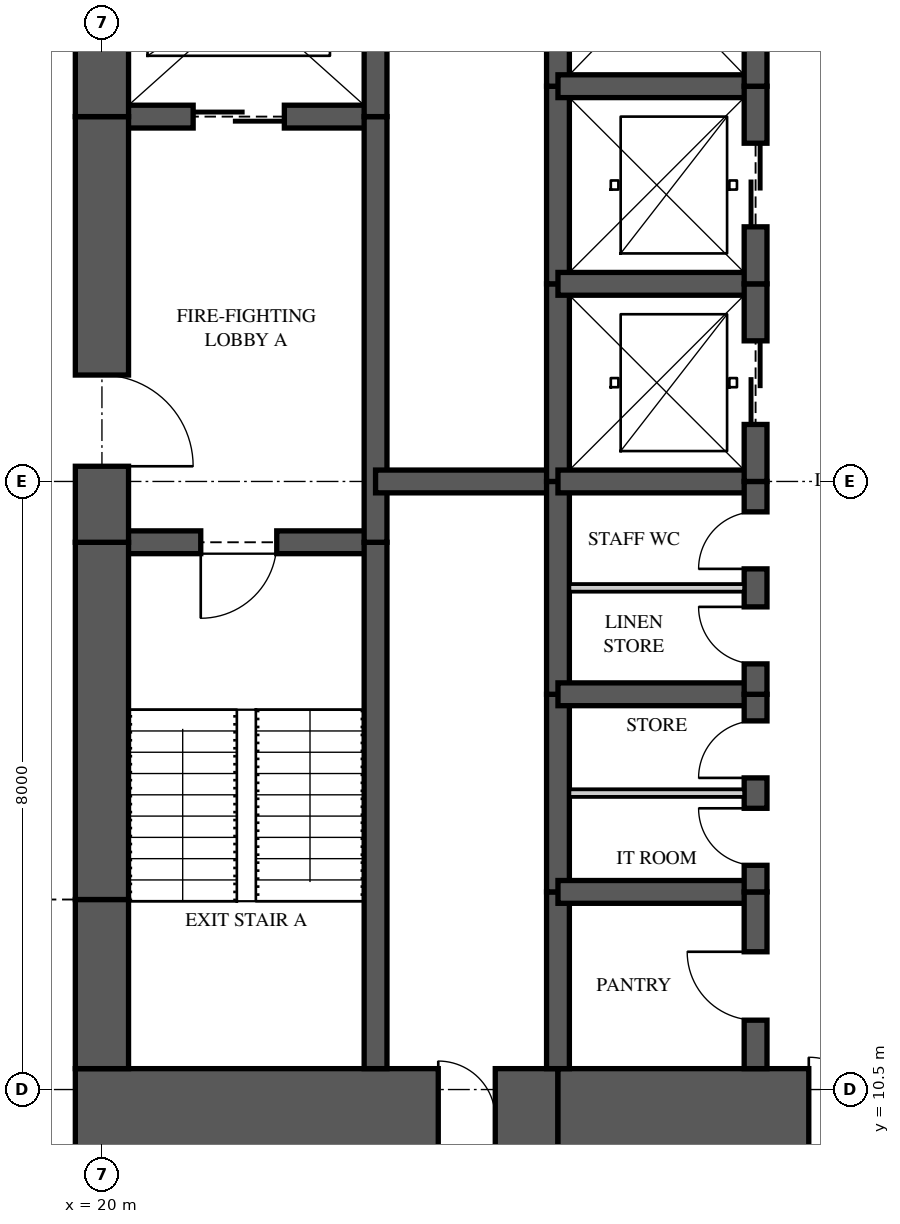
"""IFC4 building model, lengths in metres.
Left out: names, types, materials, properties, quantities, classifications, styles, units other than length and angle.
Written with IfcOpenShell. Run it as: python <this file> out.ifc"""

import sys

from ifc_helpers import new_model, si_unit, direction, frame, frame_2d, origin, place, context, subcontext, project, spatial, rectangle, extrude, element, fill, save


model = new_model("IFC4")
c1 = context("Model", 3, precision=1e-05, world=origin(), true_north=direction((0.0, 1.0)))
c2 = subcontext(c1, "Body", "Model", "MODEL_VIEW")
j1 = project(units=[si_unit("LENGTHUNIT", "METRE"), si_unit("PLANEANGLEUNIT", "RADIAN")], contexts=[c1])
p1 = place(None, origin())
s1 = spatial("IfcSite", under=j1, at=p1, CompositionType="ELEMENT")
p2 = place(p1, origin())
s2 = spatial("IfcBuilding", under=s1, at=p2, CompositionType="ELEMENT")
p3 = place(p2, frame((0.0, 0.0, 194.55)))
s3 = spatial("IfcBuildingStorey", under=s2, at=p3, CompositionType="ELEMENT", Elevation=194.55)
p4 = place(p3, frame((19.65, 10.125, 0.0), z_axis=(0.0, 0.0, 1.0), x_axis=(1.0, 0.0, 0.0)))
e1 = element("IfcWall", 1, at=p4, inside=s3, PredefinedType="SHEAR", context=c2, shape_type="SweptSolid", body=[
    extrude(rectangle(XDim=6.35, YDim=1.3, at=frame_2d((3.175, 0.0))), origin(), (0.0, 0.0, 1.0), 3.35),
])
p5 = place(p4, frame((4.775, 0.0, 0.0)))
e2 = element("IfcOpeningElement", 2, at=p5, cuts=e1, PredefinedType="OPENING", context=c2, shape_type="SweptSolid", body=[
    extrude(rectangle(XDim=0.75, YDim=2.1, at=frame_2d((0.375, 1.05))), frame((0.0, 0.66, 0.0), z_axis=(0.0, -1.0, 0.0), x_axis=(1.0, 0.0, 0.0)), (0.0, 0.0, 1.0), 1.32),
])
p6 = place(p3, frame((26.0, 10.125, 0.0), z_axis=(0.0, 0.0, 1.0), x_axis=(1.0, 0.0, 0.0)))
e3 = element("IfcWall", 3, at=p6, inside=s3, PredefinedType="SHEAR", context=c2, shape_type="SweptSolid", body=[
    extrude(rectangle(XDim=5.6, YDim=1.3, at=frame_2d((2.8, 0.0))), origin(), (0.0, 0.0, 1.0), 3.35),
])
p7 = place(p6, frame((3.3, 0.0, 0.0)))
e4 = element("IfcOpeningElement", 4, at=p7, cuts=e3, PredefinedType="OPENING", context=c2, shape_type="SweptSolid", body=[
    extrude(rectangle(XDim=1.6, YDim=2.1, at=frame_2d((0.8, 1.05))), frame((0.0, 0.66, 0.0), z_axis=(0.0, -1.0, 0.0), x_axis=(1.0, 0.0, 0.0)), (0.0, 0.0, 1.0), 1.32),
])
p8 = place(p3, frame((20.0, 26.225, 0.0), z_axis=(0.0, 0.0, 1.0), x_axis=(0.0, -1.0, 0.0)))
e5 = element("IfcWall", 5, at=p8, inside=s3, PredefinedType="SHEAR", context=c2, shape_type="SweptSolid", body=[
    extrude(rectangle(XDim=2.925, YDim=0.7, at=frame_2d((1.462, 0.0))), origin(), (0.0, 0.0, 1.0), 3.35),
])
p9 = place(p3, frame((20.0, 23.3, 0.0), z_axis=(0.0, 0.0, 1.0), x_axis=(0.0, -1.0, 0.0)))
e6 = element("IfcWall", 6, at=p9, inside=s3, PredefinedType="SHEAR", context=c2, shape_type="SweptSolid", body=[
    extrude(rectangle(XDim=5.6, YDim=0.7, at=frame_2d((2.8, 0.0))), origin(), (0.0, 0.0, 1.0), 3.35),
])
p10 = place(p9, frame((3.4, 0.0, 0.0)))
e7 = element("IfcOpeningElement", 7, at=p10, cuts=e6, PredefinedType="OPENING", context=c2, shape_type="SweptSolid", body=[
    extrude(rectangle(XDim=1.2, YDim=2.2, at=frame_2d((0.6, 1.1))), frame((0.0, 0.36, 0.0), z_axis=(0.0, -1.0, 0.0), x_axis=(1.0, 0.0, 0.0)), (0.0, 0.0, 1.0), 0.72),
])
p11 = place(p3, frame((20.0, 17.7, 0.0), z_axis=(0.0, 0.0, 1.0), x_axis=(0.0, -1.0, 0.0)))
e8 = element("IfcWall", 8, at=p11, inside=s3, PredefinedType="SHEAR", context=c2, shape_type="SweptSolid", body=[
    extrude(rectangle(XDim=4.7, YDim=0.7, at=frame_2d((2.35, 0.0))), origin(), (0.0, 0.0, 1.0), 3.35),
])
p12 = place(p3, frame((20.0, 13.0, 0.0), z_axis=(0.0, 0.0, 1.0), x_axis=(0.0, -1.0, 0.0)))
e9 = element("IfcWall", 9, at=p12, inside=s3, PredefinedType="SHEAR", context=c2, shape_type="SweptSolid", body=[
    extrude(rectangle(XDim=2.225, YDim=0.7, at=frame_2d((1.113, 0.0))), origin(), (0.0, 0.0, 1.0), 3.35),
])
p13 = place(p3, frame((23.6, 10.775, 0.0), z_axis=(0.0, 0.0, 1.0), x_axis=(0.0, 1.0, 0.0)))
e10 = element("IfcWall", 10, at=p13, inside=s3, PredefinedType="SHEAR", context=c2, shape_type="SweptSolid", body=[
    extrude(rectangle(XDim=6.925, YDim=0.3, at=frame_2d((3.462, 0.0))), origin(), (0.0, 0.0, 1.0), 3.35),
])
p14 = place(p3, frame((23.6, 17.7, 0.0), z_axis=(0.0, 0.0, 1.0), x_axis=(0.0, 1.0, 0.0)))
e11 = element("IfcWall", 11, at=p14, inside=s3, PredefinedType="SHEAR", context=c2, shape_type="SweptSolid", body=[
    extrude(rectangle(XDim=5.6, YDim=0.3, at=frame_2d((2.8, 0.0))), origin(), (0.0, 0.0, 1.0), 3.35),
])
p15 = place(p3, frame((23.6, 23.3, 0.0), z_axis=(0.0, 0.0, 1.0), x_axis=(0.0, 1.0, 0.0)))
e12 = element("IfcWall", 12, at=p15, inside=s3, PredefinedType="SHEAR", context=c2, shape_type="SweptSolid", body=[
    extrude(rectangle(XDim=2.925, YDim=0.3, at=frame_2d((1.462, 0.0))), origin(), (0.0, 0.0, 1.0), 3.35),
])
p16 = place(p3, frame((26.0, 10.775, 0.0), z_axis=(0.0, 0.0, 1.0), x_axis=(0.0, 1.0, 0.0)))
e13 = element("IfcWall", 13, at=p16, inside=s3, PredefinedType="SHEAR", context=c2, shape_type="SweptSolid", body=[
    extrude(rectangle(XDim=2.325, YDim=0.3, at=frame_2d((1.163, 0.0))), origin(), (0.0, 0.0, 1.0), 3.35),
])
p17 = place(p3, frame((26.0, 13.1, 0.0), z_axis=(0.0, 0.0, 1.0), x_axis=(0.0, 1.0, 0.0)))
e14 = element("IfcWall", 14, at=p17, inside=s3, PredefinedType="SHEAR", context=c2, shape_type="SweptSolid", body=[
    extrude(rectangle(XDim=2.6, YDim=0.3, at=frame_2d((1.3, 0.0))), origin(), (0.0, 0.0, 1.0), 3.35),
])
p18 = place(p3, frame((26.0, 15.7, 0.0), z_axis=(0.0, 0.0, 1.0), x_axis=(0.0, 1.0, 0.0)))
e15 = element("IfcWall", 15, at=p18, inside=s3, PredefinedType="SHEAR", context=c2, shape_type="SweptSolid", body=[
    extrude(rectangle(XDim=2.8, YDim=0.3, at=frame_2d((1.4, 0.0))), origin(), (0.0, 0.0, 1.0), 3.35),
])
p19 = place(p3, frame((26.0, 18.5, 0.0), z_axis=(0.0, 0.0, 1.0), x_axis=(0.0, 1.0, 0.0)))
e16 = element("IfcWall", 16, at=p19, inside=s3, PredefinedType="SHEAR", context=c2, shape_type="SweptSolid", body=[
    extrude(rectangle(XDim=2.6, YDim=0.3, at=frame_2d((1.3, 0.0))), origin(), (0.0, 0.0, 1.0), 3.35),
])
p20 = place(p3, frame((26.0, 21.1, 0.0), z_axis=(0.0, 0.0, 1.0), x_axis=(0.0, 1.0, 0.0)))
e17 = element("IfcWall", 17, at=p20, inside=s3, PredefinedType="SHEAR", context=c2, shape_type="SweptSolid", body=[
    extrude(rectangle(XDim=2.6, YDim=0.3, at=frame_2d((1.3, 0.0))), origin(), (0.0, 0.0, 1.0), 3.35),
])
p21 = place(p3, frame((26.0, 23.7, 0.0), z_axis=(0.0, 0.0, 1.0), x_axis=(0.0, 1.0, 0.0)))
e18 = element("IfcWall", 18, at=p21, inside=s3, PredefinedType="SHEAR", context=c2, shape_type="SweptSolid", body=[
    extrude(rectangle(XDim=2.525, YDim=0.3, at=frame_2d((1.263, 0.0))), origin(), (0.0, 0.0, 1.0), 3.35),
])
p22 = place(p3, frame((28.6, 10.775, 0.0), z_axis=(0.0, 0.0, 1.0), x_axis=(0.0, 1.0, 0.0)))
e19 = element("IfcWall", 19, at=p22, inside=s3, PredefinedType="SHEAR", context=c2, shape_type="SweptSolid", body=[
    extrude(rectangle(XDim=2.325, YDim=0.3, at=frame_2d((1.163, 0.0))), origin(), (0.0, 0.0, 1.0), 3.35),
])
p23 = place(p22, frame((0.637, 0.0, 0.0)))
e20 = element("IfcOpeningElement", 20, at=p23, cuts=e19, PredefinedType="OPENING", context=c2, shape_type="SweptSolid", body=[
    extrude(rectangle(XDim=0.9, YDim=2.1, at=frame_2d((0.45, 1.05))), frame((0.0, 0.16, 0.0), z_axis=(0.0, -1.0, 0.0), x_axis=(1.0, 0.0, 0.0)), (0.0, 0.0, 1.0), 0.32),
])
p24 = place(p3, frame((28.6, 13.1, 0.0), z_axis=(0.0, 0.0, 1.0), x_axis=(0.0, 1.0, 0.0)))
e21 = element("IfcWall", 21, at=p24, inside=s3, PredefinedType="SHEAR", context=c2, shape_type="SweptSolid", body=[
    extrude(rectangle(XDim=2.6, YDim=0.3, at=frame_2d((1.3, 0.0))), origin(), (0.0, 0.0, 1.0), 3.35),
])
p25 = place(p24, frame((0.35, 0.0, 0.0)))
e22 = element("IfcOpeningElement", 22, at=p25, cuts=e21, PredefinedType="OPENING", context=c2, shape_type="SweptSolid", body=[
    extrude(rectangle(XDim=0.75, YDim=2.1, at=frame_2d((0.375, 1.05))), frame((0.0, 0.16, 0.0), z_axis=(0.0, -1.0, 0.0), x_axis=(1.0, 0.0, 0.0)), (0.0, 0.0, 1.0), 0.32),
])
p26 = place(p24, frame((1.5, 0.0, 0.0)))
e23 = element("IfcOpeningElement", 23, at=p26, cuts=e21, PredefinedType="OPENING", context=c2, shape_type="SweptSolid", body=[
    extrude(rectangle(XDim=0.75, YDim=2.1, at=frame_2d((0.375, 1.05))), frame((0.0, 0.16, 0.0), z_axis=(0.0, -1.0, 0.0), x_axis=(1.0, 0.0, 0.0)), (0.0, 0.0, 1.0), 0.32),
])
p27 = place(p3, frame((28.6, 15.7, 0.0), z_axis=(0.0, 0.0, 1.0), x_axis=(0.0, 1.0, 0.0)))
e24 = element("IfcWall", 24, at=p27, inside=s3, PredefinedType="SHEAR", context=c2, shape_type="SweptSolid", body=[
    extrude(rectangle(XDim=2.8, YDim=0.3, at=frame_2d((1.4, 0.0))), origin(), (0.0, 0.0, 1.0), 3.35),
])
p28 = place(p27, frame((0.4, 0.0, 0.0)))
e25 = element("IfcOpeningElement", 25, at=p28, cuts=e24, PredefinedType="OPENING", context=c2, shape_type="SweptSolid", body=[
    extrude(rectangle(XDim=0.75, YDim=2.1, at=frame_2d((0.375, 1.05))), frame((0.0, 0.16, 0.0), z_axis=(0.0, -1.0, 0.0), x_axis=(1.0, 0.0, 0.0)), (0.0, 0.0, 1.0), 0.32),
])
p29 = place(p27, frame((1.65, 0.0, 0.0)))
e26 = element("IfcOpeningElement", 26, at=p29, cuts=e24, PredefinedType="OPENING", context=c2, shape_type="SweptSolid", body=[
    extrude(rectangle(XDim=0.75, YDim=2.1, at=frame_2d((0.375, 1.05))), frame((0.0, 0.16, 0.0), z_axis=(0.0, -1.0, 0.0), x_axis=(1.0, 0.0, 0.0)), (0.0, 0.0, 1.0), 0.32),
])
p30 = place(p3, frame((28.6, 18.5, 0.0), z_axis=(0.0, 0.0, 1.0), x_axis=(0.0, 1.0, 0.0)))
e27 = element("IfcWall", 27, at=p30, inside=s3, PredefinedType="SHEAR", context=c2, shape_type="SweptSolid", body=[
    extrude(rectangle(XDim=2.6, YDim=0.3, at=frame_2d((1.3, 0.0))), origin(), (0.0, 0.0, 1.0), 3.35),
])
p31 = place(p30, frame((0.75, 0.0, 0.0)))
e28 = element("IfcOpeningElement", 28, at=p31, cuts=e27, PredefinedType="OPENING", context=c2, shape_type="SweptSolid", body=[
    extrude(rectangle(XDim=1.1, YDim=2.1, at=frame_2d((0.55, 1.05))), frame((0.0, 0.16, 0.0), z_axis=(0.0, -1.0, 0.0), x_axis=(1.0, 0.0, 0.0)), (0.0, 0.0, 1.0), 0.32),
])
p32 = place(p3, frame((28.6, 21.1, 0.0), z_axis=(0.0, 0.0, 1.0), x_axis=(0.0, 1.0, 0.0)))
e29 = element("IfcWall", 29, at=p32, inside=s3, PredefinedType="SHEAR", context=c2, shape_type="SweptSolid", body=[
    extrude(rectangle(XDim=2.6, YDim=0.3, at=frame_2d((1.3, 0.0))), origin(), (0.0, 0.0, 1.0), 3.35),
])
p33 = place(p32, frame((0.75, 0.0, 0.0)))
e30 = element("IfcOpeningElement", 30, at=p33, cuts=e29, PredefinedType="OPENING", context=c2, shape_type="SweptSolid", body=[
    extrude(rectangle(XDim=1.1, YDim=2.1, at=frame_2d((0.55, 1.05))), frame((0.0, 0.16, 0.0), z_axis=(0.0, -1.0, 0.0), x_axis=(1.0, 0.0, 0.0)), (0.0, 0.0, 1.0), 0.32),
])
p34 = place(p3, frame((28.6, 23.7, 0.0), z_axis=(0.0, 0.0, 1.0), x_axis=(0.0, 1.0, 0.0)))
e31 = element("IfcWall", 31, at=p34, inside=s3, PredefinedType="SHEAR", context=c2, shape_type="SweptSolid", body=[
    extrude(rectangle(XDim=2.525, YDim=0.3, at=frame_2d((1.263, 0.0))), origin(), (0.0, 0.0, 1.0), 3.35),
])
p35 = place(p34, frame((0.85, 0.0, 0.0)))
e32 = element("IfcOpeningElement", 32, at=p35, cuts=e31, PredefinedType="OPENING", context=c2, shape_type="SweptSolid", body=[
    extrude(rectangle(XDim=1.1, YDim=2.1, at=frame_2d((0.55, 1.05))), frame((0.0, 0.16, 0.0), z_axis=(0.0, -1.0, 0.0), x_axis=(1.0, 0.0, 0.0)), (0.0, 0.0, 1.0), 0.32),
])
p36 = place(p3, frame((20.0, 17.7, 0.0), z_axis=(0.0, 0.0, 1.0), x_axis=(1.0, 0.0, 0.0)))
e33 = element("IfcWall", 33, at=p36, inside=s3, PredefinedType="SHEAR", context=c2, shape_type="SweptSolid", body=[
    extrude(rectangle(XDim=3.6, YDim=0.3, at=frame_2d((1.8, 0.0))), origin(), (0.0, 0.0, 1.0), 3.35),
])
p37 = place(p36, frame((1.3, 0.0, 0.0)))
e34 = element("IfcOpeningElement", 34, at=p37, cuts=e33, PredefinedType="OPENING", context=c2, shape_type="SweptSolid", body=[
    extrude(rectangle(XDim=1.0, YDim=2.1, at=frame_2d((0.5, 1.05))), frame((0.0, 0.16, 0.0), z_axis=(0.0, -1.0, 0.0), x_axis=(1.0, 0.0, 0.0)), (0.0, 0.0, 1.0), 0.32),
])
p38 = place(p3, frame((20.0, 23.3, 0.0), z_axis=(0.0, 0.0, 1.0), x_axis=(1.0, 0.0, 0.0)))
e35 = element("IfcWall", 35, at=p38, inside=s3, PredefinedType="SHEAR", context=c2, shape_type="SweptSolid", body=[
    extrude(rectangle(XDim=3.6, YDim=0.3, at=frame_2d((1.8, 0.0))), origin(), (0.0, 0.0, 1.0), 3.35),
])
p39 = place(p38, frame((1.2, 0.0, 0.0)))
e36 = element("IfcOpeningElement", 36, at=p39, cuts=e35, PredefinedType="OPENING", context=c2, shape_type="SweptSolid", body=[
    extrude(rectangle(XDim=1.2, YDim=2.1, at=frame_2d((0.6, 1.05))), frame((0.0, 0.16, 0.0), z_axis=(0.0, -1.0, 0.0), x_axis=(1.0, 0.0, 0.0)), (0.0, 0.0, 1.0), 0.32),
])
p40 = place(p3, frame((23.6, 18.5, 0.0), z_axis=(0.0, 0.0, 1.0), x_axis=(1.0, 0.0, 0.0)))
e37 = element("IfcWall", 37, at=p40, inside=s3, PredefinedType="SHEAR", context=c2, shape_type="SweptSolid", body=[
    extrude(rectangle(XDim=2.4, YDim=0.3, at=frame_2d((1.2, 0.0))), origin(), (0.0, 0.0, 1.0), 3.35),
])
for number, where, z_axis, x_axis in (
    (38, (26.0, 13.1, 0.0), (0.0, 0.0, 1.0), (1.0, 0.0, 0.0)),
    (39, (26.0, 15.7, 0.0), (0.0, 0.0, 1.0), (1.0, 0.0, 0.0)),
    (40, (26.0, 18.5, 0.0), (0.0, 0.0, 1.0), (1.0, 0.0, 0.0)),
    (41, (26.0, 21.1, 0.0), (0.0, 0.0, 1.0), (1.0, 0.0, 0.0)),
    (42, (26.0, 23.7, 0.0), (0.0, 0.0, 1.0), (1.0, 0.0, 0.0)),
):
    element("IfcWall", number, at=place(p3, frame(where, z_axis=z_axis, x_axis=x_axis)), inside=s3, PredefinedType="SHEAR", context=c2, shape_type="SweptSolid", body=[
        extrude(rectangle(XDim=2.6, YDim=0.3, at=frame_2d((1.3, 0.0))), origin(), (0.0, 0.0, 1.0), 3.35),
    ])
for number, where, z_axis, x_axis in (
    (43, (26.15, 14.4, 0.0), (0.0, 0.0, 1.0), (1.0, 0.0, 0.0)),
    (44, (26.15, 17.1, 0.0), (0.0, 0.0, 1.0), (1.0, 0.0, 0.0)),
):
    element("IfcWall", number, at=place(p3, frame(where, z_axis=z_axis, x_axis=x_axis)), inside=s3, PredefinedType="PARTITIONING", context=c2, shape_type="SweptSolid", body=[
        extrude(rectangle(XDim=2.3, YDim=0.1, at=frame_2d((1.15, 0.0))), origin(), (0.0, 0.0, 1.0), 3.11),
    ])
p41 = place(p37, frame((1.0, 0.0, 0.0), z_axis=(0.0, 0.0, 1.0), x_axis=(-1.0, 0.0, 0.0)))
e45 = element("IfcDoor", 45, at=p41, inside=s3, OperationType="SINGLE_SWING_RIGHT", PredefinedType="DOOR", context=c2, shape_type="SweptSolid", body=[
    extrude(rectangle(XDim=1.0, YDim=2.1, at=frame_2d((0.5, 1.05))), frame((0.0, 0.025, 0.0), z_axis=(0.0, -1.0, 0.0), x_axis=(1.0, 0.0, 0.0)), (0.0, 0.0, 1.0), 0.05),
])
fill(e34, e45)
p42 = place(p10, origin())
e46 = element("IfcDoor", 46, at=p42, inside=s3, OperationType="SINGLE_SWING_RIGHT", PredefinedType="DOOR", context=c2, shape_type="SweptSolid", body=[
    extrude(rectangle(XDim=1.2, YDim=2.2, at=frame_2d((0.6, 1.1))), frame((0.0, 0.025, 0.0), z_axis=(0.0, -1.0, 0.0), x_axis=(1.0, 0.0, 0.0)), (0.0, 0.0, 1.0), 0.05),
])
fill(e7, e46)
p43 = place(p39, origin())
e47 = element("IfcDoor", 47, at=p43, inside=s3, OperationType="SLIDING_TO_LEFT", PredefinedType="DOOR", context=c2, shape_type="SweptSolid", body=[
    extrude(rectangle(XDim=1.2, YDim=2.1, at=frame_2d((0.6, 1.05))), frame((0.0, 0.025, 0.0), z_axis=(0.0, -1.0, 0.0), x_axis=(1.0, 0.0, 0.0)), (0.0, 0.0, 1.0), 0.05),
])
fill(e36, e47)
p44 = place(p31, origin())
e48 = element("IfcDoor", 48, at=p44, inside=s3, OperationType="SLIDING_TO_LEFT", PredefinedType="DOOR", context=c2, shape_type="SweptSolid", body=[
    extrude(rectangle(XDim=1.1, YDim=2.1, at=frame_2d((0.55, 1.05))), frame((0.0, 0.025, 0.0), z_axis=(0.0, -1.0, 0.0), x_axis=(1.0, 0.0, 0.0)), (0.0, 0.0, 1.0), 0.05),
])
fill(e28, e48)
p45 = place(p33, origin())
e49 = element("IfcDoor", 49, at=p45, inside=s3, OperationType="SLIDING_TO_LEFT", PredefinedType="DOOR", context=c2, shape_type="SweptSolid", body=[
    extrude(rectangle(XDim=1.1, YDim=2.1, at=frame_2d((0.55, 1.05))), frame((0.0, 0.025, 0.0), z_axis=(0.0, -1.0, 0.0), x_axis=(1.0, 0.0, 0.0)), (0.0, 0.0, 1.0), 0.05),
])
fill(e30, e49)
p46 = place(p23, origin())
e50 = element("IfcDoor", 50, at=p46, inside=s3, OperationType="SINGLE_SWING_RIGHT", PredefinedType="DOOR", context=c2, shape_type="SweptSolid", body=[
    extrude(rectangle(XDim=0.9, YDim=2.1, at=frame_2d((0.45, 1.05))), frame((0.0, 0.025, 0.0), z_axis=(0.0, -1.0, 0.0), x_axis=(1.0, 0.0, 0.0)), (0.0, 0.0, 1.0), 0.05),
])
fill(e20, e50)
p47 = place(p25, origin())
e51 = element("IfcDoor", 51, at=p47, inside=s3, OperationType="SINGLE_SWING_RIGHT", PredefinedType="DOOR", context=c2, shape_type="SweptSolid", body=[
    extrude(rectangle(XDim=0.75, YDim=2.1, at=frame_2d((0.375, 1.05))), frame((0.0, 0.025, 0.0), z_axis=(0.0, -1.0, 0.0), x_axis=(1.0, 0.0, 0.0)), (0.0, 0.0, 1.0), 0.05),
])
fill(e22, e51)
p48 = place(p26, origin())
e52 = element("IfcDoor", 52, at=p48, inside=s3, OperationType="SINGLE_SWING_LEFT", PredefinedType="DOOR", context=c2, shape_type="SweptSolid", body=[
    extrude(rectangle(XDim=0.75, YDim=2.1, at=frame_2d((0.375, 1.05))), frame((0.0, 0.025, 0.0), z_axis=(0.0, -1.0, 0.0), x_axis=(1.0, 0.0, 0.0)), (0.0, 0.0, 1.0), 0.05),
])
fill(e23, e52)
p49 = place(p28, origin())
e53 = element("IfcDoor", 53, at=p49, inside=s3, OperationType="SINGLE_SWING_RIGHT", PredefinedType="DOOR", context=c2, shape_type="SweptSolid", body=[
    extrude(rectangle(XDim=0.75, YDim=2.1, at=frame_2d((0.375, 1.05))), frame((0.0, 0.025, 0.0), z_axis=(0.0, -1.0, 0.0), x_axis=(1.0, 0.0, 0.0)), (0.0, 0.0, 1.0), 0.05),
])
fill(e25, e53)
p50 = place(p29, origin())
e54 = element("IfcDoor", 54, at=p50, inside=s3, OperationType="SINGLE_SWING_LEFT", PredefinedType="DOOR", context=c2, shape_type="SweptSolid", body=[
    extrude(rectangle(XDim=0.75, YDim=2.1, at=frame_2d((0.375, 1.05))), frame((0.0, 0.025, 0.0), z_axis=(0.0, -1.0, 0.0), x_axis=(1.0, 0.0, 0.0)), (0.0, 0.0, 1.0), 0.05),
])
fill(e26, e54)
p51 = place(p7, origin())
e55 = element("IfcDoor", 55, at=p51, inside=s3, OperationType="DOUBLE_DOOR_SINGLE_SWING", PredefinedType="DOOR", context=c2, shape_type="SweptSolid", body=[
    extrude(rectangle(XDim=1.6, YDim=2.1, at=frame_2d((0.8, 1.05))), frame((0.0, 0.025, 0.0), z_axis=(0.0, -1.0, 0.0), x_axis=(1.0, 0.0, 0.0)), (0.0, 0.0, 1.0), 0.05),
])
fill(e4, e55)
p52 = place(p5, origin())
e56 = element("IfcDoor", 56, at=p52, inside=s3, OperationType="SINGLE_SWING_LEFT", PredefinedType="DOOR", context=c2, shape_type="SweptSolid", body=[
    extrude(rectangle(XDim=0.75, YDim=2.1, at=frame_2d((0.375, 1.05))), frame((0.0, 0.025, 0.0), z_axis=(0.0, -1.0, 0.0), x_axis=(1.0, 0.0, 0.0)), (0.0, 0.0, 1.0), 0.05),
])
fill(e2, e56)
save(model, sys.argv[1])
